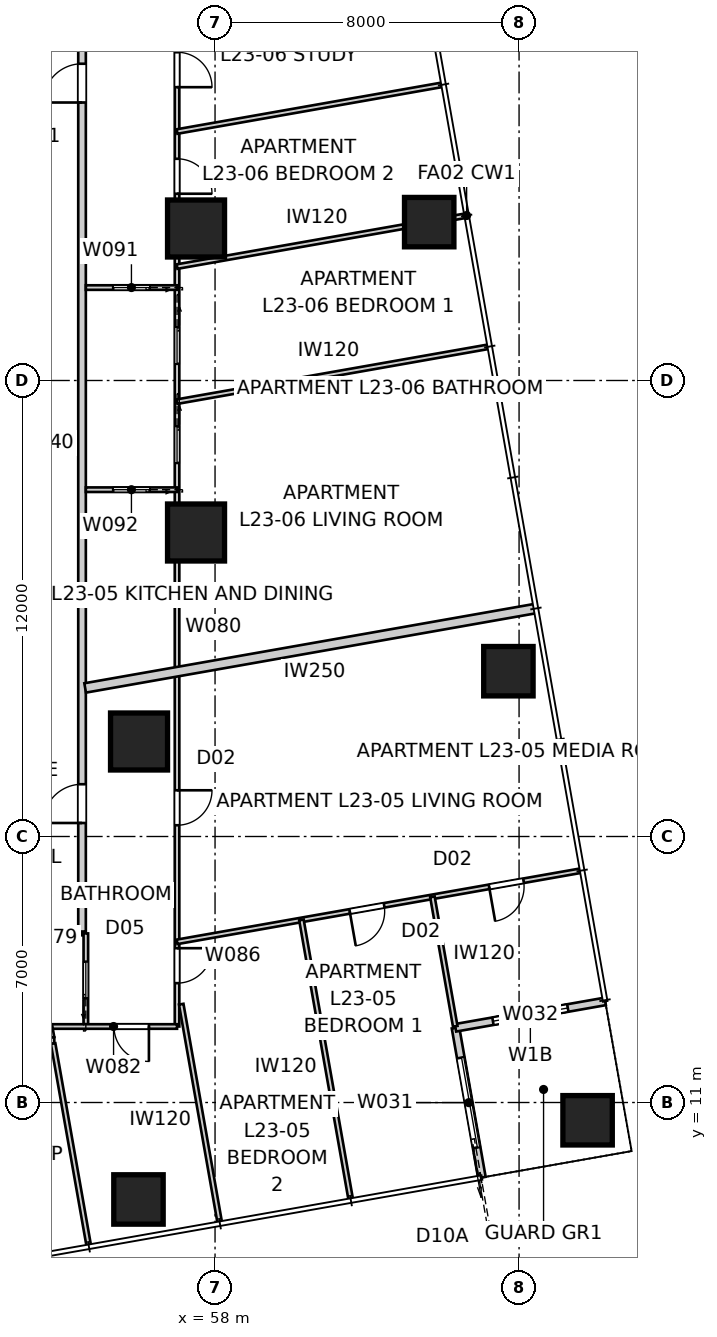
"""IFC4 building model, lengths in metres.
Left out: names, types, materials, properties, quantities, classifications, styles, units other than length and angle.
Written with IfcOpenShell. Run it as: python <this file> out.ifc"""

import sys

from ifc_helpers import new_model, si_unit, direction, frame, frame_2d, origin, origin_2d, place, context, subcontext, project, spatial, rectangle, extrude, element, fill, save


model = new_model("IFC4")
c1 = context("Model", 3, precision=1e-05, world=origin(), true_north=direction((0.0, 1.0)))
c2 = subcontext(c1, "Body", "Model", "MODEL_VIEW")
j1 = project(units=[si_unit("LENGTHUNIT", "METRE"), si_unit("PLANEANGLEUNIT", "RADIAN")], contexts=[c1])
p1 = place(None, origin())
s1 = spatial("IfcSite", under=j1, at=p1, CompositionType="ELEMENT")
p2 = place(p1, origin())
s2 = spatial("IfcBuilding", under=s1, at=p2, CompositionType="ELEMENT")
p3 = place(p2, frame((0.0, 0.0, 86.2)))
s3 = spatial("IfcBuildingStorey", under=s2, at=p3, CompositionType="ELEMENT", Elevation=86.2)
for number, where, z_axis, x_axis in (
    (1, (55.985, 8.448, 0.0), (0.0, 0.0, 1.0), (1.0, 0.0, 0.0)),
    (2, (67.803, 10.532, 0.0), (0.0, 0.0, 1.0), (1.0, 0.0, 0.0)),
    (3, (65.719, 22.35, 0.0), (0.0, 0.0, 1.0), (1.0, 0.0, 0.0)),
    (4, (63.635, 34.167, 0.0), (0.0, 0.0, 1.0), (1.0, 0.0, 0.0)),
):
    element("IfcColumn", number, at=place(p3, frame(where, z_axis=z_axis, x_axis=x_axis)), inside=s3, PredefinedType="COLUMN", context=c2, shape_type="SweptSolid", body=[
        extrude(rectangle(XDim=1.3, YDim=1.3, at=origin_2d()), origin(), (0.0, 0.0, 1.0), 3.4),
    ])
for number, where, z_axis, x_axis in (
    (5, (57.5, 26.0, 0.0), (0.0, 0.0, 1.0), (1.0, 0.0, 0.0)),
    (6, (57.5, 34.0, 0.0), (0.0, 0.0, 1.0), (1.0, 0.0, 0.0)),
    (7, (56.0, 20.5, 0.0), (0.0, 0.0, 1.0), (1.0, 0.0, 0.0)),
):
    element("IfcColumn", number, at=place(p3, frame(where, z_axis=z_axis, x_axis=x_axis)), inside=s3, PredefinedType="COLUMN", context=c2, shape_type="SweptSolid", body=[
        extrude(rectangle(XDim=1.5, YDim=1.5, at=origin_2d()), origin(), (0.0, 0.0, 1.0), 3.4),
    ])
p4 = place(p3, frame((65.022, 9.026, 0.0), z_axis=(0.0, 0.0, 1.0), x_axis=(-0.173646056486, 0.984808127031, 0.0)))
e8 = element("IfcWall", 8, at=p4, inside=s3, PredefinedType="SOLIDWALL", context=c2, shape_type="SweptSolid", body=[
    extrude(rectangle(XDim=4.0, YDim=0.2, at=frame_2d((2.0, 0.0))), origin(), (0.0, 0.0, 1.0), 3.25),
])
p5 = place(p4, frame((0.8, 0.0, 0.0)))
e9 = element("IfcOpeningElement", 9, at=p5, cuts=e8, PredefinedType="OPENING", context=c2, shape_type="SweptSolid", body=[
    extrude(rectangle(XDim=2.4, YDim=2.1, at=frame_2d((1.2, 1.05))), frame((0.0, 0.11, 0.0), z_axis=(0.0, -1.0, 0.0), x_axis=(1.0, 0.0, 0.0)), (0.0, 0.0, 1.0), 0.22),
])
p6 = place(p3, frame((64.328, 12.966, 0.0), z_axis=(0.0, 0.0, 1.0), x_axis=(0.984808127031, 0.173646056486, 0.0)))
e10 = element("IfcWall", 10, at=p6, inside=s3, PredefinedType="SOLIDWALL", context=c2, shape_type="SweptSolid", body=[
    extrude(rectangle(XDim=4.0, YDim=0.2, at=frame_2d((2.0, 0.0))), origin(), (0.0, 0.0, 1.0), 3.25),
])
p7 = place(p6, frame((1.0, 0.0, 0.45)))
e11 = element("IfcOpeningElement", 11, at=p7, cuts=e10, PredefinedType="OPENING", context=c2, shape_type="SweptSolid", body=[
    extrude(rectangle(XDim=2.0, YDim=1.8, at=frame_2d((1.0, 0.9))), frame((0.0, 0.11, 0.0), z_axis=(0.0, -1.0, 0.0), x_axis=(1.0, 0.0, 0.0)), (0.0, 0.0, 1.0), 0.22),
])
p8 = place(p3, frame((25.5, 15.5, 0.0), z_axis=(0.0, 0.0, 1.0), x_axis=(1.0, 0.0, 0.0)))
e12 = element("IfcWall", 12, at=p8, inside=s3, PredefinedType="PARTITIONING", context=c2, shape_type="SweptSolid", body=[
    extrude(rectangle(XDim=29.0, YDim=0.2, at=frame_2d((14.5, 0.0))), origin(), (0.0, 0.0, 1.0), 3.25),
])
p9 = place(p8, frame((15.794, 0.0, 0.0)))
e13 = element("IfcOpeningElement", 13, at=p9, cuts=e12, PredefinedType="OPENING", context=c2, shape_type="SweptSolid", body=[
    extrude(rectangle(XDim=1.02, YDim=2.34, at=frame_2d((0.51, 1.17))), frame((0.0, 0.11, 0.0), z_axis=(0.0, -1.0, 0.0), x_axis=(1.0, 0.0, 0.0)), (0.0, 0.0, 1.0), 0.22),
])
p10 = place(p8, frame((6.067, 0.0, 0.0)))
e14 = element("IfcOpeningElement", 14, at=p10, cuts=e12, PredefinedType="OPENING", context=c2, shape_type="SweptSolid", body=[
    extrude(rectangle(XDim=1.02, YDim=2.34, at=frame_2d((0.51, 1.17))), frame((0.0, 0.11, 0.0), z_axis=(0.0, -1.0, 0.0), x_axis=(1.0, 0.0, 0.0)), (0.0, 0.0, 1.0), 0.22),
])
p11 = place(p8, frame((1.079, 0.0, 0.0)))
e15 = element("IfcOpeningElement", 15, at=p11, cuts=e12, PredefinedType="OPENING", context=c2, shape_type="SweptSolid", body=[
    extrude(rectangle(XDim=1.02, YDim=2.34, at=frame_2d((0.51, 1.17))), frame((0.0, 0.11, 0.0), z_axis=(0.0, -1.0, 0.0), x_axis=(1.0, 0.0, 0.0)), (0.0, 0.0, 1.0), 0.22),
])
p12 = place(p3, frame((54.5, 15.5, 0.0), z_axis=(0.0, 0.0, 1.0), x_axis=(0.0, 1.0, 0.0)))
e16 = element("IfcWall", 16, at=p12, inside=s3, PredefinedType="PARTITIONING", context=c2, shape_type="SweptSolid", body=[
    extrude(rectangle(XDim=29.0, YDim=0.2, at=frame_2d((14.5, 0.0))), origin(), (0.0, 0.0, 1.0), 3.25),
])
p13 = place(p12, frame((21.815, 0.0, 0.0)))
e17 = element("IfcOpeningElement", 17, at=p13, cuts=e16, PredefinedType="OPENING", context=c2, shape_type="SweptSolid", body=[
    extrude(rectangle(XDim=1.02, YDim=2.34, at=frame_2d((0.51, 1.17))), frame((0.0, 0.11, 0.0), z_axis=(0.0, -1.0, 0.0), x_axis=(1.0, 0.0, 0.0)), (0.0, 0.0, 1.0), 0.22),
])
p14 = place(p12, frame((2.855, 0.0, 0.0)))
e18 = element("IfcOpeningElement", 18, at=p14, cuts=e16, PredefinedType="OPENING", context=c2, shape_type="SweptSolid", body=[
    extrude(rectangle(XDim=1.02, YDim=2.1, at=frame_2d((0.51, 1.05))), frame((0.0, 0.11, 0.0), z_axis=(0.0, -1.0, 0.0), x_axis=(1.0, 0.0, 0.0)), (0.0, 0.0, 1.0), 0.22),
])
p15 = place(p3, frame((66.444, 24.001, 0.0), z_axis=(0.0, 0.0, 1.0), x_axis=(-0.984806609184, -0.173654664517, 0.0)))
e19 = element("IfcWall", 19, at=p15, inside=s3, PredefinedType="PARTITIONING", context=c2, shape_type="SweptSolid", body=[
    extrude(rectangle(XDim=12.044, YDim=0.25, at=frame_2d((6.022, 0.0))), origin(), (0.0, 0.0, 1.0), 3.25),
])
p16 = place(p3, frame((54.6, 13.0, 0.0), z_axis=(0.0, 0.0, 1.0), x_axis=(0.0, 1.0, 0.0)))
e20 = element("IfcWall", 20, at=p16, inside=s3, PredefinedType="PARTITIONING", context=c2, shape_type="SweptSolid", body=[
    extrude(rectangle(XDim=2.45, YDim=0.12, at=frame_2d((1.225, 0.0))), origin(), (0.0, 0.0, 1.0), 3.25),
])
p17 = place(p16, frame((0.745, 0.0, 0.0)))
e21 = element("IfcOpeningElement", 21, at=p17, cuts=e20, PredefinedType="OPENING", context=c2, shape_type="SweptSolid", body=[
    extrude(rectangle(XDim=0.96, YDim=2.1, at=frame_2d((0.48, 1.05))), frame((0.0, 0.07, 0.0), z_axis=(0.0, -1.0, 0.0), x_axis=(1.0, 0.0, 0.0)), (0.0, 0.0, 1.0), 0.14),
])
p18 = place(p3, frame((57.0, 47.0, 0.0), z_axis=(0.0, 0.0, 1.0), x_axis=(0.0, -1.0, 0.0)))
e22 = element("IfcWall", 22, at=p18, inside=s3, PredefinedType="PARTITIONING", context=c2, shape_type="SweptSolid", body=[
    extrude(rectangle(XDim=34.0, YDim=0.12, at=frame_2d((17.0, 0.0))), origin(), (0.0, 0.0, 1.0), 2.55),
])
p19 = place(p18, frame((8.361, 0.0, 0.0)))
e23 = element("IfcOpeningElement", 23, at=p19, cuts=e22, PredefinedType="OPENING", context=c2, shape_type="SweptSolid", body=[
    extrude(rectangle(XDim=0.92, YDim=2.34, at=frame_2d((0.46, 1.17))), frame((0.0, 0.07, 0.0), z_axis=(0.0, -1.0, 0.0), x_axis=(1.0, 0.0, 0.0)), (0.0, 0.0, 1.0), 0.14),
])
p20 = place(p18, frame((11.166, 0.0, 0.0)))
e24 = element("IfcOpeningElement", 24, at=p20, cuts=e22, PredefinedType="OPENING", context=c2, shape_type="SweptSolid", body=[
    extrude(rectangle(XDim=0.92, YDim=2.34, at=frame_2d((0.46, 1.17))), frame((0.0, 0.07, 0.0), z_axis=(0.0, -1.0, 0.0), x_axis=(1.0, 0.0, 0.0)), (0.0, 0.0, 1.0), 0.14),
])
p21 = place(p18, frame((4.683, 0.0, 0.0)))
e25 = element("IfcOpeningElement", 25, at=p21, cuts=e22, PredefinedType="OPENING", context=c2, shape_type="SweptSolid", body=[
    extrude(rectangle(XDim=0.92, YDim=2.34, at=frame_2d((0.46, 1.17))), frame((0.0, 0.07, 0.0), z_axis=(0.0, -1.0, 0.0), x_axis=(1.0, 0.0, 0.0)), (0.0, 0.0, 1.0), 0.14),
])
p22 = place(p18, frame((27.784, 0.0, 0.0)))
e26 = element("IfcOpeningElement", 26, at=p22, cuts=e22, PredefinedType="OPENING", context=c2, shape_type="SweptSolid", body=[
    extrude(rectangle(XDim=0.92, YDim=2.34, at=frame_2d((0.46, 1.17))), frame((0.0, 0.07, 0.0), z_axis=(0.0, -1.0, 0.0), x_axis=(1.0, 0.0, 0.0)), (0.0, 0.0, 1.0), 0.14),
])
p23 = place(p18, frame((31.939, 0.0, 0.0)))
e27 = element("IfcOpeningElement", 27, at=p23, cuts=e22, PredefinedType="OPENING", context=c2, shape_type="SweptSolid", body=[
    extrude(rectangle(XDim=0.92, YDim=2.34, at=frame_2d((0.46, 1.17))), frame((0.0, 0.07, 0.0), z_axis=(0.0, -1.0, 0.0), x_axis=(1.0, 0.0, 0.0)), (0.0, 0.0, 1.0), 0.14),
])
p24 = place(p18, frame((15.601, 0.0, 0.0)))
e28 = element("IfcOpeningElement", 28, at=p24, cuts=e22, PredefinedType="OPENING", context=c2, shape_type="SweptSolid", body=[
    extrude(rectangle(XDim=0.96, YDim=2.1, at=frame_2d((0.48, 1.05))), frame((0.0, 0.07, 0.0), z_axis=(0.0, -1.0, 0.0), x_axis=(1.0, 0.0, 0.0)), (0.0, 0.0, 1.0), 0.14),
])
p25 = place(p18, frame((18.21, 0.0, 0.0)))
e29 = element("IfcOpeningElement", 29, at=p25, cuts=e22, PredefinedType="OPENING", context=c2, shape_type="SweptSolid", body=[
    extrude(rectangle(XDim=0.96, YDim=2.1, at=frame_2d((0.48, 1.05))), frame((0.0, 0.07, 0.0), z_axis=(0.0, -1.0, 0.0), x_axis=(1.0, 0.0, 0.0)), (0.0, 0.0, 1.0), 0.14),
])
p26 = place(p18, frame((1.19, 0.0, 0.0)))
e30 = element("IfcOpeningElement", 30, at=p26, cuts=e22, PredefinedType="OPENING", context=c2, shape_type="SweptSolid", body=[
    extrude(rectangle(XDim=0.96, YDim=2.1, at=frame_2d((0.48, 1.05))), frame((0.0, 0.07, 0.0), z_axis=(0.0, -1.0, 0.0), x_axis=(1.0, 0.0, 0.0)), (0.0, 0.0, 1.0), 0.14),
])
p27 = place(p3, frame((57.0, 13.0, 0.0), z_axis=(0.0, 0.0, 1.0), x_axis=(-1.0, 0.0, 0.0)))
e31 = element("IfcWall", 31, at=p27, inside=s3, PredefinedType="PARTITIONING", context=c2, shape_type="SweptSolid", body=[
    extrude(rectangle(XDim=3.34, YDim=0.12, at=frame_2d((1.67, 0.0))), origin(), (0.0, 0.0, 1.0), 3.25),
])
p28 = place(p27, frame((0.74, 0.0, 0.0)))
e32 = element("IfcOpeningElement", 32, at=p28, cuts=e31, PredefinedType="OPENING", context=c2, shape_type="SweptSolid", body=[
    extrude(rectangle(XDim=0.92, YDim=2.34, at=frame_2d((0.46, 1.17))), frame((0.0, 0.07, 0.0), z_axis=(0.0, -1.0, 0.0), x_axis=(1.0, 0.0, 0.0)), (0.0, 0.0, 1.0), 0.14),
])
p29 = place(p3, frame((53.66, 13.0, 0.0), z_axis=(0.0, 0.0, 1.0), x_axis=(0.172927442902, -0.984934566096, 0.0)))
e33 = element("IfcWall", 33, at=p29, inside=s3, PredefinedType="PARTITIONING", context=c2, shape_type="SweptSolid", body=[
    extrude(rectangle(XDim=0.292, YDim=0.12, at=frame_2d((0.146, 0.0))), origin(), (0.0, 0.0, 1.0), 3.25),
])
p30 = place(p3, frame((67.62, 17.1, 0.0), z_axis=(0.0, 0.0, 1.0), x_axis=(-0.984807253583, -0.173651010046, 0.0)))
e34 = element("IfcWall", 34, at=p30, inside=s3, PredefinedType="PARTITIONING", context=c2, shape_type="SweptSolid", body=[
    extrude(rectangle(XDim=10.783, YDim=0.12, at=frame_2d((5.392, 0.0))), origin(), (0.0, 0.0, 1.0), 3.25),
])
p31 = place(p30, frame((1.525, 0.0, 0.0)))
e35 = element("IfcOpeningElement", 35, at=p31, cuts=e34, PredefinedType="OPENING", context=c2, shape_type="SweptSolid", body=[
    extrude(rectangle(XDim=0.92, YDim=2.34, at=frame_2d((0.46, 1.17))), frame((0.0, 0.07, 0.0), z_axis=(0.0, -1.0, 0.0), x_axis=(1.0, 0.0, 0.0)), (0.0, 0.0, 1.0), 0.14),
])
p32 = place(p30, frame((5.25, 0.0, 0.0)))
e36 = element("IfcOpeningElement", 36, at=p32, cuts=e34, PredefinedType="OPENING", context=c2, shape_type="SweptSolid", body=[
    extrude(rectangle(XDim=0.92, YDim=2.34, at=frame_2d((0.46, 1.17))), frame((0.0, 0.07, 0.0), z_axis=(0.0, -1.0, 0.0), x_axis=(1.0, 0.0, 0.0)), (0.0, 0.0, 1.0), 0.14),
])
p33 = place(p3, frame((61.568, 8.458, 0.0), z_axis=(0.0, 0.0, 1.0), x_axis=(-0.173647177755, 0.984807929323, 0.0)))
e37 = element("IfcWall", 37, at=p33, inside=s3, PredefinedType="PARTITIONING", context=c2, shape_type="SweptSolid", body=[
    extrude(rectangle(XDim=7.46, YDim=0.12, at=frame_2d((3.73, 0.0))), origin(), (0.0, 0.0, 1.0), 3.25),
])
p34 = place(p3, frame((63.72, 16.412, 0.0), z_axis=(0.0, 0.0, 1.0), x_axis=(0.173660541335, -0.984805572884, 0.0)))
e38 = element("IfcWall", 38, at=p34, inside=s3, PredefinedType="PARTITIONING", context=c2, shape_type="SweptSolid", body=[
    extrude(rectangle(XDim=3.46, YDim=0.12, at=frame_2d((1.73, 0.0))), origin(), (0.0, 0.0, 1.0), 3.25),
])
p35 = place(p3, frame((58.122, 7.85, 0.0), z_axis=(0.0, 0.0, 1.0), x_axis=(-0.173634707655, 0.984810128044, 0.0)))
e39 = element("IfcWall", 39, at=p35, inside=s3, PredefinedType="PARTITIONING", context=c2, shape_type="SweptSolid", body=[
    extrude(rectangle(XDim=5.825, YDim=0.12, at=frame_2d((2.913, 0.0))), origin(), (0.0, 0.0, 1.0), 2.638),
])
p36 = place(p3, frame((53.739, 12.55, 0.0), z_axis=(0.0, 0.0, 1.0), x_axis=(0.173632864151, -0.984810453076, 0.0)))
e40 = element("IfcWall", 40, at=p36, inside=s3, PredefinedType="PARTITIONING", context=c2, shape_type="SweptSolid", body=[
    extrude(rectangle(XDim=5.389, YDim=0.12, at=frame_2d((2.695, 0.0))), origin(), (0.0, 0.0, 1.0), 3.25),
])
p37 = place(p3, frame((57.0, 32.446, 0.0), z_axis=(0.0, 0.0, 1.0), x_axis=(-1.0, 0.0, 0.0)))
e41 = element("IfcWall", 41, at=p37, inside=s3, PredefinedType="PARTITIONING", context=c2, shape_type="SweptSolid", body=[
    extrude(rectangle(XDim=2.4, YDim=0.12, at=frame_2d((1.2, 0.0))), origin(), (0.0, 0.0, 1.0), 3.25),
])
p38 = place(p37, frame((0.72, 0.0, 0.0)))
e42 = element("IfcOpeningElement", 42, at=p38, cuts=e41, PredefinedType="OPENING", context=c2, shape_type="SweptSolid", body=[
    extrude(rectangle(XDim=0.96, YDim=2.1, at=frame_2d((0.48, 1.05))), frame((0.0, 0.07, 0.0), z_axis=(0.0, -1.0, 0.0), x_axis=(1.0, 0.0, 0.0)), (0.0, 0.0, 1.0), 0.14),
])
p39 = place(p3, frame((57.0, 27.126, 0.0), z_axis=(0.0, 0.0, 1.0), x_axis=(-1.0, 0.0, 0.0)))
e43 = element("IfcWall", 43, at=p39, inside=s3, PredefinedType="PARTITIONING", context=c2, shape_type="SweptSolid", body=[
    extrude(rectangle(XDim=2.4, YDim=0.12, at=frame_2d((1.2, 0.0))), origin(), (0.0, 0.0, 1.0), 2.796),
])
p40 = place(p39, frame((0.72, 0.0, 0.0)))
e44 = element("IfcOpeningElement", 44, at=p40, cuts=e43, PredefinedType="OPENING", context=c2, shape_type="SweptSolid", body=[
    extrude(rectangle(XDim=0.96, YDim=2.1, at=frame_2d((0.48, 1.05))), frame((0.0, 0.07, 0.0), z_axis=(0.0, -1.0, 0.0), x_axis=(1.0, 0.0, 0.0)), (0.0, 0.0, 1.0), 0.14),
])
p41 = place(p3, frame((57.0, 29.444, 0.0), z_axis=(0.0, 0.0, 1.0), x_axis=(0.984807787824, 0.173647980238, 0.0)))
e45 = element("IfcWall", 45, at=p41, inside=s3, PredefinedType="PARTITIONING", context=c2, shape_type="SweptSolid", body=[
    extrude(rectangle(XDim=8.315, YDim=0.12, at=frame_2d((4.157, 0.0))), origin(), (0.0, 0.0, 1.0), 3.25),
])
p42 = place(p3, frame((57.0, 32.998, 0.0), z_axis=(0.0, 0.0, 1.0), x_axis=(0.984808453088, 0.173644207293, 0.0)))
e46 = element("IfcWall", 46, at=p42, inside=s3, PredefinedType="PARTITIONING", context=c2, shape_type="SweptSolid", body=[
    extrude(rectangle(XDim=7.698, YDim=0.12, at=frame_2d((3.849, 0.0))), origin(), (0.0, 0.0, 1.0), 3.25),
])
p43 = place(p3, frame((57.0, 36.552, 0.0), z_axis=(0.0, 0.0, 1.0), x_axis=(0.984809234282, 0.173639776761, 0.0)))
e47 = element("IfcWall", 47, at=p43, inside=s3, PredefinedType="PARTITIONING", context=c2, shape_type="SweptSolid", body=[
    extrude(rectangle(XDim=7.081, YDim=0.12, at=frame_2d((3.541, 0.0))), origin(), (0.0, 0.0, 1.0), 3.25),
])
p44 = place(p3, frame((53.71, 12.712, 0.0), z_axis=(0.0, 0.0, 1.0), x_axis=(0.0, -1.0, 0.0)))
e48 = element("IfcWall", 48, at=p44, inside=s3, PredefinedType="PARTITIONING", context=c2, shape_type="SweptSolid", body=[
    extrude(rectangle(XDim=0.162, YDim=0.12, at=frame_2d((0.081, 0.0))), origin(), (0.0, 0.0, 1.0), 3.25),
])
p45 = place(p5, origin())
e49 = element("IfcDoor", 49, at=p45, inside=s3, OperationType="SLIDING_TO_LEFT", PredefinedType="DOOR", context=c2, shape_type="SweptSolid", body=[
    extrude(rectangle(XDim=2.4, YDim=2.1, at=frame_2d((1.2, 1.05))), frame((0.0, 0.025, 0.0), z_axis=(0.0, -1.0, 0.0), x_axis=(1.0, 0.0, 0.0)), (0.0, 0.0, 1.0), 0.05),
])
fill(e9, e49)
p46 = place(p7, origin())
e50 = element("IfcWindow", 50, at=p46, inside=s3, PartitioningType="SINGLE_PANEL", PredefinedType="WINDOW", context=c2, shape_type="SweptSolid", body=[
    extrude(rectangle(XDim=2.0, YDim=1.8, at=frame_2d((1.0, 0.9))), frame((0.0, 0.03, 0.0), z_axis=(0.0, -1.0, 0.0), x_axis=(1.0, 0.0, 0.0)), (0.0, 0.0, 1.0), 0.06),
])
fill(e11, e50)
p47 = place(p13, origin())
e51 = element("IfcDoor", 51, at=p47, inside=s3, OperationType="SINGLE_SWING_LEFT", PredefinedType="DOOR", context=c2, shape_type="SweptSolid", body=[
    extrude(rectangle(XDim=1.02, YDim=2.34, at=frame_2d((0.51, 1.17))), frame((0.0, 0.025, 0.0), z_axis=(0.0, -1.0, 0.0), x_axis=(1.0, 0.0, 0.0)), (0.0, 0.0, 1.0), 0.05),
])
fill(e17, e51)
p48 = place(p14, origin())
e52 = element("IfcDoor", 52, at=p48, inside=s3, OperationType="SINGLE_SWING_LEFT", PredefinedType="DOOR", context=c2, shape_type="SweptSolid", body=[
    extrude(rectangle(XDim=1.02, YDim=2.1, at=frame_2d((0.51, 1.05))), frame((0.0, 0.025, 0.0), z_axis=(0.0, -1.0, 0.0), x_axis=(1.0, 0.0, 0.0)), (0.0, 0.0, 1.0), 0.05),
])
fill(e18, e52)
p49 = place(p19, origin())
e53 = element("IfcDoor", 53, at=p49, inside=s3, OperationType="SINGLE_SWING_RIGHT", PredefinedType="DOOR", context=c2, shape_type="SweptSolid", body=[
    extrude(rectangle(XDim=0.92, YDim=2.34, at=frame_2d((0.46, 1.17))), frame((0.0, 0.025, 0.0), z_axis=(0.0, -1.0, 0.0), x_axis=(1.0, 0.0, 0.0)), (0.0, 0.0, 1.0), 0.05),
])
fill(e23, e53)
p50 = place(p20, origin())
e54 = element("IfcDoor", 54, at=p50, inside=s3, OperationType="SINGLE_SWING_RIGHT", PredefinedType="DOOR", context=c2, shape_type="SweptSolid", body=[
    extrude(rectangle(XDim=0.92, YDim=2.34, at=frame_2d((0.46, 1.17))), frame((0.0, 0.025, 0.0), z_axis=(0.0, -1.0, 0.0), x_axis=(1.0, 0.0, 0.0)), (0.0, 0.0, 1.0), 0.05),
])
fill(e24, e54)
p51 = place(p38, origin())
e55 = element("IfcDoor", 55, at=p51, inside=s3, OperationType="SLIDING_TO_LEFT", PredefinedType="DOOR", context=c2, shape_type="SweptSolid", body=[
    extrude(rectangle(XDim=0.96, YDim=2.1, at=frame_2d((0.48, 1.05))), frame((0.0, 0.025, 0.0), z_axis=(0.0, -1.0, 0.0), x_axis=(1.0, 0.0, 0.0)), (0.0, 0.0, 1.0), 0.05),
])
fill(e42, e55)
p52 = place(p22, origin())
e56 = element("IfcDoor", 56, at=p52, inside=s3, OperationType="SINGLE_SWING_LEFT", PredefinedType="DOOR", context=c2, shape_type="SweptSolid", body=[
    extrude(rectangle(XDim=0.92, YDim=2.34, at=frame_2d((0.46, 1.17))), frame((0.0, 0.025, 0.0), z_axis=(0.0, -1.0, 0.0), x_axis=(1.0, 0.0, 0.0)), (0.0, 0.0, 1.0), 0.05),
])
fill(e26, e56)
p53 = place(p17, origin())
e57 = element("IfcDoor", 57, at=p53, inside=s3, OperationType="SLIDING_TO_LEFT", PredefinedType="DOOR", context=c2, shape_type="SweptSolid", body=[
    extrude(rectangle(XDim=0.96, YDim=2.1, at=frame_2d((0.48, 1.05))), frame((0.0, 0.025, 0.0), z_axis=(0.0, -1.0, 0.0), x_axis=(1.0, 0.0, 0.0)), (0.0, 0.0, 1.0), 0.05),
])
fill(e21, e57)
p54 = place(p28, origin())
e58 = element("IfcDoor", 58, at=p54, inside=s3, OperationType="SINGLE_SWING_LEFT", PredefinedType="DOOR", context=c2, shape_type="SweptSolid", body=[
    extrude(rectangle(XDim=0.92, YDim=2.34, at=frame_2d((0.46, 1.17))), frame((0.0, 0.025, 0.0), z_axis=(0.0, -1.0, 0.0), x_axis=(1.0, 0.0, 0.0)), (0.0, 0.0, 1.0), 0.05),
])
fill(e32, e58)
p55 = place(p23, origin())
e59 = element("IfcDoor", 59, at=p55, inside=s3, OperationType="SINGLE_SWING_LEFT", PredefinedType="DOOR", context=c2, shape_type="SweptSolid", body=[
    extrude(rectangle(XDim=0.92, YDim=2.34, at=frame_2d((0.46, 1.17))), frame((0.0, 0.025, 0.0), z_axis=(0.0, -1.0, 0.0), x_axis=(1.0, 0.0, 0.0)), (0.0, 0.0, 1.0), 0.05),
])
fill(e27, e59)
p56 = place(p24, origin())
e60 = element("IfcDoor", 60, at=p56, inside=s3, OperationType="SLIDING_TO_LEFT", PredefinedType="DOOR", context=c2, shape_type="SweptSolid", body=[
    extrude(rectangle(XDim=0.96, YDim=2.1, at=frame_2d((0.48, 1.05))), frame((0.0, 0.025, 0.0), z_axis=(0.0, -1.0, 0.0), x_axis=(1.0, 0.0, 0.0)), (0.0, 0.0, 1.0), 0.05),
])
fill(e28, e60)
p57 = place(p40, origin())
e61 = element("IfcDoor", 61, at=p57, inside=s3, OperationType="SLIDING_TO_LEFT", PredefinedType="DOOR", context=c2, shape_type="SweptSolid", body=[
    extrude(rectangle(XDim=0.96, YDim=2.1, at=frame_2d((0.48, 1.05))), frame((0.0, 0.025, 0.0), z_axis=(0.0, -1.0, 0.0), x_axis=(1.0, 0.0, 0.0)), (0.0, 0.0, 1.0), 0.05),
])
fill(e44, e61)
p58 = place(p25, origin())
e62 = element("IfcDoor", 62, at=p58, inside=s3, OperationType="SLIDING_TO_LEFT", PredefinedType="DOOR", context=c2, shape_type="SweptSolid", body=[
    extrude(rectangle(XDim=0.96, YDim=2.1, at=frame_2d((0.48, 1.05))), frame((0.0, 0.025, 0.0), z_axis=(0.0, -1.0, 0.0), x_axis=(1.0, 0.0, 0.0)), (0.0, 0.0, 1.0), 0.05),
])
fill(e29, e62)
p59 = place(p31, origin())
e63 = element("IfcDoor", 63, at=p59, inside=s3, OperationType="SINGLE_SWING_RIGHT", PredefinedType="DOOR", context=c2, shape_type="SweptSolid", body=[
    extrude(rectangle(XDim=0.92, YDim=2.34, at=frame_2d((0.46, 1.17))), frame((0.0, 0.025, 0.0), z_axis=(0.0, -1.0, 0.0), x_axis=(1.0, 0.0, 0.0)), (0.0, 0.0, 1.0), 0.05),
])
fill(e35, e63)
p60 = place(p32, origin())
e64 = element("IfcDoor", 64, at=p60, inside=s3, OperationType="SINGLE_SWING_RIGHT", PredefinedType="DOOR", context=c2, shape_type="SweptSolid", body=[
    extrude(rectangle(XDim=0.92, YDim=2.34, at=frame_2d((0.46, 1.17))), frame((0.0, 0.025, 0.0), z_axis=(0.0, -1.0, 0.0), x_axis=(1.0, 0.0, 0.0)), (0.0, 0.0, 1.0), 0.05),
])
fill(e36, e64)
save(model, sys.argv[1])
